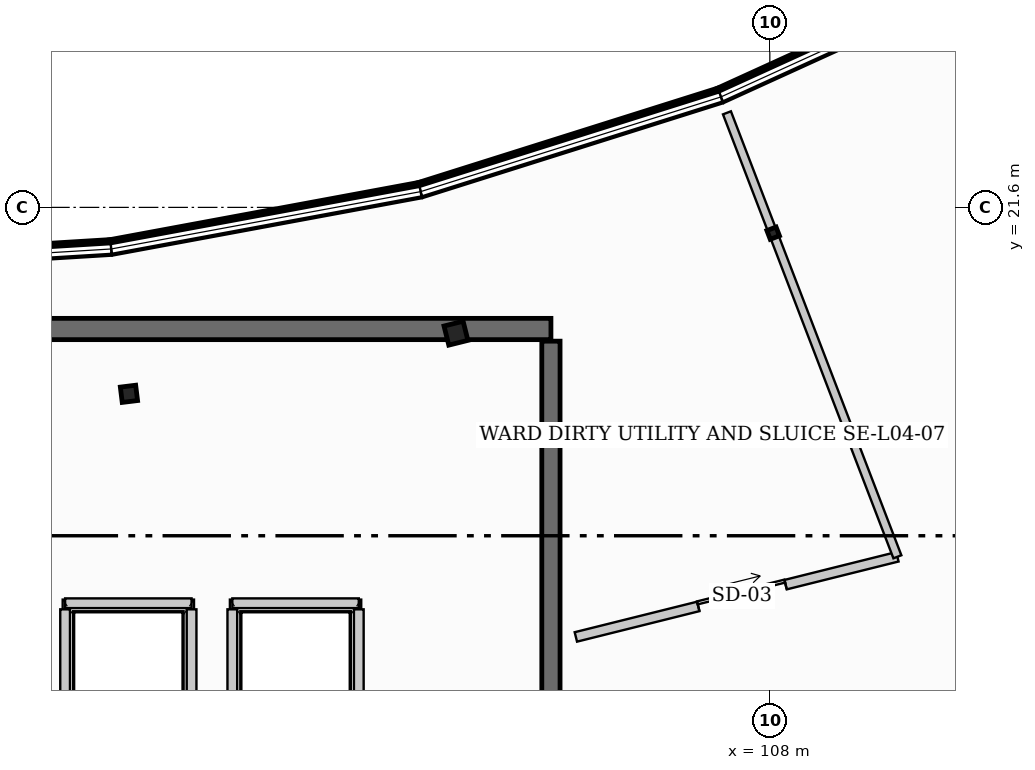
"""IFC4 building model, lengths in metres.
Left out: names, types, materials, properties, quantities, classifications, styles, units other than length and angle.
Written with IfcOpenShell. Run it as: python <this file> out.ifc"""

import sys

from ifc_helpers import new_model, si_unit, direction, frame, frame_2d, origin, origin_2d, place, context, subcontext, project, spatial, rectangle, hollow_circle, i_section, extrude, element, fill, save


model = new_model("IFC4")
c1 = context("Model", 3, precision=1e-05, world=origin(), true_north=direction((0.0, 1.0)))
c2 = subcontext(c1, "Body", "Model", "MODEL_VIEW")
j1 = project(units=[si_unit("LENGTHUNIT", "METRE"), si_unit("PLANEANGLEUNIT", "RADIAN")], contexts=[c1])
p1 = place(None, origin())
s1 = spatial("IfcSite", under=j1, at=p1, CompositionType="ELEMENT")
p2 = place(p1, origin())
s2 = spatial("IfcBuilding", under=s1, at=p2, CompositionType="ELEMENT")
p3 = place(p2, frame((0.0, 0.0, 18.3)))
s3 = spatial("IfcBuildingStorey", under=s2, at=p3, CompositionType="ELEMENT", Elevation=18.3)
p4 = place(p3, frame((97.46, 18.534, 0.0), z_axis=(0.0, 0.0, 1.0), x_axis=(-0.121869343405, 0.992546151641, 0.0)))
e1 = element("IfcColumn", 1, at=p4, inside=s3, PredefinedType="COLUMN", context=c2, shape_type="SweptSolid", body=[
    extrude(i_section(OverallWidth=0.254, OverallDepth=0.254, WebThickness=0.009, FlangeThickness=0.014, at=origin_2d()), origin(), (0.0, 0.0, 1.0), 3.9),
])
p5 = place(p3, frame((102.838, 19.531, 0.0), z_axis=(0.0, 0.0, 1.0), x_axis=(-0.2419218956, 0.970295726276, 0.0)))
e2 = element("IfcColumn", 2, at=p5, inside=s3, PredefinedType="COLUMN", context=c2, shape_type="SweptSolid", body=[
    extrude(hollow_circle(Radius=0.162, WallThickness=0.013, at=origin_2d()), origin(), (0.0, 0.0, 1.0), 3.9),
])
p6 = place(p3, frame((108.055, 21.176, 0.0), z_axis=(0.0, 0.0, 1.0), x_axis=(-0.358367949545, 0.933580426497, 0.0)))
e3 = element("IfcColumn", 3, at=p6, inside=s3, PredefinedType="COLUMN", context=c2, shape_type="SweptSolid", body=[
    extrude(i_section(OverallWidth=0.154, OverallDepth=0.162, WebThickness=0.008, FlangeThickness=0.011, at=origin_2d()), origin(), (0.0, 0.0, 1.0), 3.9),
])
p7 = place(p3, frame((84.0, 19.6, 0.0), z_axis=(0.0, 0.0, 1.0), x_axis=(1.0, 0.0, 0.0)))
e4 = element("IfcWall", 4, at=p7, inside=s3, PredefinedType="SHEAR", context=c2, shape_type="SweptSolid", body=[
    extrude(rectangle(XDim=20.4, YDim=0.35, at=frame_2d((10.2, 0.0))), origin(), (0.0, 0.0, 1.0), 3.9),
])
p8 = place(p3, frame((104.4, 19.4, 0.0), z_axis=(0.0, 0.0, 1.0), x_axis=(0.0, -1.0, 0.0)))
e5 = element("IfcWall", 5, at=p8, inside=s3, PredefinedType="SHEAR", context=c2, shape_type="SweptSolid", body=[
    extrude(rectangle(XDim=10.6, YDim=0.3, at=frame_2d((5.3, 0.0))), origin(), (0.0, 0.0, 1.0), 3.9),
])
p9 = place(p8, frame((7.2, 0.0, 0.0)))
e6 = element("IfcOpeningElement", 6, at=p9, cuts=e5, PredefinedType="OPENING", context=c2, shape_type="SweptSolid", body=[
    extrude(rectangle(XDim=1.52, YDim=2.16, at=frame_2d((0.76, 1.08))), frame((0.0, 0.16, 0.0), z_axis=(0.0, -1.0, 0.0), x_axis=(1.0, 0.0, 0.0)), (0.0, 0.0, 1.0), 0.32),
])
p10 = place(p3, frame((107.195, 23.416, 0.0), z_axis=(0.0, 0.0, 1.0), x_axis=(0.909955822384, 0.414705198074, 0.0)))
e7 = element("IfcWall", 7, at=p10, inside=s3, PredefinedType="STANDARD", context=c2, shape_type="SweptSolid", body=[
    extrude(rectangle(XDim=5.177, YDim=0.22, at=frame_2d((2.588, 0.0))), origin(), (0.0, 0.0, 1.0), 1.05),
])
p11 = place(p3, frame((102.257, 21.859, 0.0), z_axis=(0.0, 0.0, 1.0), x_axis=(0.953706582316, 0.300738681994, 0.0)))
e8 = element("IfcWall", 8, at=p11, inside=s3, PredefinedType="STANDARD", context=c2, shape_type="SweptSolid", body=[
    extrude(rectangle(XDim=5.178, YDim=0.22, at=frame_2d((2.589, 0.0))), origin(), (0.0, 0.0, 1.0), 1.05),
])
for number, where, z_axis, x_axis in (
    (9, (97.167, 20.916, 0.0), (0.0, 0.0, 1.0), (0.983, 0.182, 0.0)),
    (10, (92.0, 20.6, 0.0), (0.0, 0.0, 1.0), (0.998, 0.061, 0.0)),
):
    element("IfcWall", number, at=place(p3, frame(where, z_axis=z_axis, x_axis=x_axis)), inside=s3, PredefinedType="STANDARD", context=c2, shape_type="SweptSolid", body=[
        extrude(rectangle(XDim=5.177, YDim=0.22, at=frame_2d((2.588, 0.0))), origin(), (0.0, 0.0, 1.0), 1.05),
    ])
p12 = place(p3, frame((98.49, 15.09, 0.0), z_axis=(0.0, 0.0, 1.0), x_axis=(-1.0, 0.0, 0.0)))
e11 = element("IfcWall", 11, at=p12, inside=s3, PredefinedType="PARTITIONING", context=c2, shape_type="SweptSolid", body=[
    extrude(rectangle(XDim=2.08, YDim=0.16, at=frame_2d((1.04, 0.0))), origin(), (0.0, 0.0, 1.0), 3.54),
])
for number, where, z_axis, x_axis in (
    (12, (96.41, 14.99, 0.0), (0.0, 0.0, 1.0), (0.0, -1.0, 0.0)),
    (13, (98.49, 12.21, 0.0), (0.0, 0.0, 1.0), (0.0, 1.0, 0.0)),
):
    element("IfcWall", number, at=place(p3, frame(where, z_axis=z_axis, x_axis=x_axis)), inside=s3, PredefinedType="PARTITIONING", context=c2, shape_type="SweptSolid", body=[
        extrude(rectangle(XDim=2.78, YDim=0.16, at=frame_2d((1.39, 0.0))), origin(), (0.0, 0.0, 1.0), 3.54),
    ])
p13 = place(p3, frame((101.24, 15.09, 0.0), z_axis=(0.0, 0.0, 1.0), x_axis=(-1.0, 0.0, 0.0)))
e14 = element("IfcWall", 14, at=p13, inside=s3, PredefinedType="PARTITIONING", context=c2, shape_type="SweptSolid", body=[
    extrude(rectangle(XDim=2.08, YDim=0.16, at=frame_2d((1.04, 0.0))), origin(), (0.0, 0.0, 1.0), 3.54),
])
for number, where, z_axis, x_axis in (
    (15, (99.16, 14.99, 0.0), (0.0, 0.0, 1.0), (0.0, -1.0, 0.0)),
    (16, (101.24, 12.21, 0.0), (0.0, 0.0, 1.0), (0.0, 1.0, 0.0)),
):
    element("IfcWall", number, at=place(p3, frame(where, z_axis=z_axis, x_axis=x_axis)), inside=s3, PredefinedType="PARTITIONING", context=c2, shape_type="SweptSolid", body=[
        extrude(rectangle(XDim=2.78, YDim=0.16, at=frame_2d((1.39, 0.0))), origin(), (0.0, 0.0, 1.0), 3.54),
    ])
p14 = place(p3, frame((104.81, 14.536, 0.0), z_axis=(0.0, 0.0, 1.0), x_axis=(0.970308293834, 0.241871484298, 0.0)))
e17 = element("IfcWall", 17, at=p14, inside=s3, PredefinedType="PARTITIONING", context=c2, shape_type="SweptSolid", body=[
    extrude(rectangle(XDim=5.45, YDim=0.16, at=frame_2d((2.725, 0.0))), origin(), (0.0, 0.0, 1.0), 3.088),
])
p15 = place(p14, frame((2.075, 0.0, 0.0)))
e18 = element("IfcOpeningElement", 18, at=p15, cuts=e17, PredefinedType="OPENING", context=c2, shape_type="SweptSolid", body=[
    extrude(rectangle(XDim=1.48, YDim=2.26, at=frame_2d((0.74, 1.13))), frame((0.0, 0.09, 0.0), z_axis=(0.0, -1.0, 0.0), x_axis=(1.0, 0.0, 0.0)), (0.0, 0.0, 1.0), 0.18),
])
p16 = place(p3, frame((110.098, 15.854, 0.0), z_axis=(0.0, 0.0, 1.0), x_axis=(-0.358410014332, 0.933564278251, 0.0)))
e19 = element("IfcWall", 19, at=p16, inside=s3, PredefinedType="PARTITIONING", context=c2, shape_type="SweptSolid", body=[
    extrude(rectangle(XDim=7.821, YDim=0.14, at=frame_2d((3.91, 0.0))), origin(), (0.0, 0.0, 1.0), 3.088),
])
p17 = place(p15, origin())
e20 = element("IfcDoor", 20, at=p17, inside=s3, OperationType="SLIDING_TO_LEFT", PredefinedType="DOOR", context=c2, shape_type="SweptSolid", body=[
    extrude(rectangle(XDim=1.48, YDim=2.26, at=frame_2d((0.74, 1.13))), frame((0.0, 0.025, 0.0), z_axis=(0.0, -1.0, 0.0), x_axis=(1.0, 0.0, 0.0)), (0.0, 0.0, 1.0), 0.05),
])
fill(e18, e20)
save(model, sys.argv[1])
